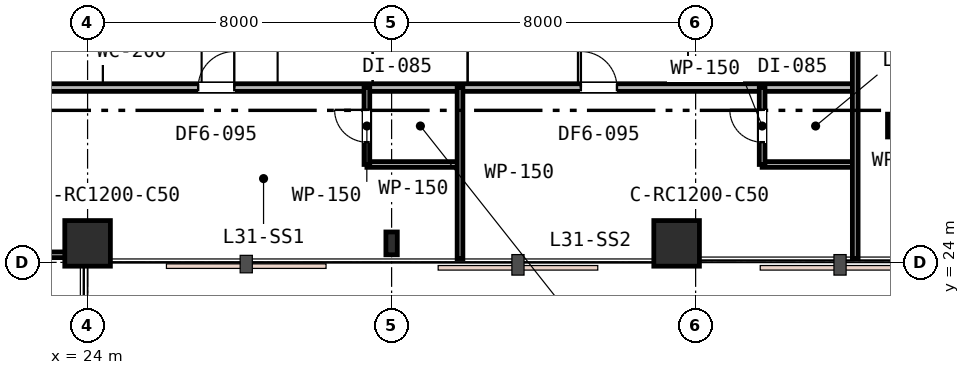
"""IFC4 building model, lengths in metres.
Left out: names, types, materials, properties, quantities, classifications, styles, units other than length and angle.
Written with IfcOpenShell. Run it as: python <this file> out.ifc"""

import sys

from ifc_helpers import new_model, si_unit, direction, frame, frame_2d, origin, origin_2d, place, context, subcontext, project, spatial, rectangle, i_section, extrude, element, fill, save


model = new_model("IFC4")
c1 = context("Model", 3, precision=1e-05, world=origin(), true_north=direction((0.0, 1.0)))
c2 = subcontext(c1, "Body", "Model", "MODEL_VIEW")
j1 = project(units=[si_unit("LENGTHUNIT", "METRE"), si_unit("PLANEANGLEUNIT", "RADIAN")], contexts=[c1])
p1 = place(None, origin())
s1 = spatial("IfcSite", under=j1, at=p1, CompositionType="ELEMENT")
p2 = place(p1, origin())
s2 = spatial("IfcBuilding", under=s1, at=p2, CompositionType="ELEMENT")
p3 = place(p2, frame((0.0, 0.0, 122.4)))
s3 = spatial("IfcBuildingStorey", under=s2, at=p3, CompositionType="ELEMENT", Elevation=122.4)
p4 = place(p3, frame((24.0, 24.5, 0.0), z_axis=(0.0, 0.0, 1.0), x_axis=(1.0, 0.0, 0.0)))
e1 = element("IfcColumn", 1, at=p4, inside=s3, PredefinedType="COLUMN", context=c2, shape_type="SweptSolid", body=[
    extrude(rectangle(XDim=1.2, YDim=1.2, at=origin_2d()), origin(), (0.0, 0.0, 1.0), 3.6),
])
p5 = place(p3, frame((32.0, 24.5, 0.0), z_axis=(0.0, 0.0, 1.0), x_axis=(1.0, 0.0, 0.0)))
e2 = element("IfcColumn", 2, at=p5, inside=s3, PredefinedType="COLUMN", context=c2, shape_type="SweptSolid", body=[
    extrude(i_section(OverallWidth=0.3, OverallDepth=0.6, WebThickness=0.015, FlangeThickness=0.03, FilletRadius=0.027, at=origin_2d()), origin(), (0.0, 0.0, 1.0), 3.6),
])
p6 = place(p3, frame((39.5, 24.5, 0.0), z_axis=(0.0, 0.0, 1.0), x_axis=(1.0, 0.0, 0.0)))
e3 = element("IfcColumn", 3, at=p6, inside=s3, PredefinedType="COLUMN", context=c2, shape_type="SweptSolid", body=[
    extrude(rectangle(XDim=1.2, YDim=1.2, at=origin_2d()), origin(), (0.0, 0.0, 1.0), 3.6),
])
p7 = place(p3, frame((45.2, 27.6, 0.0), z_axis=(0.0, 0.0, 1.0), x_axis=(1.0, 0.0, 0.0)))
e4 = element("IfcColumn", 4, at=p7, inside=s3, PredefinedType="COLUMN", context=c2, shape_type="SweptSolid", body=[
    extrude(i_section(OverallWidth=0.3, OverallDepth=0.6, WebThickness=0.015, FlangeThickness=0.03, FilletRadius=0.027, at=origin_2d()), origin(), (0.0, 0.0, 1.0), 3.6),
])
p8 = place(p3, frame((7.2, 28.6, 0.0), z_axis=(0.0, 0.0, 1.0), x_axis=(1.0, 0.0, 0.0)))
e5 = element("IfcWall", 5, at=p8, inside=s3, PredefinedType="PARTITIONING", context=c2, shape_type="SweptSolid", body=[
    extrude(rectangle(XDim=37.0, YDim=0.2, at=frame_2d((18.5, 0.0))), origin(), (0.0, 0.0, 1.0), 2.87),
])
p9 = place(p8, frame((19.71, 0.0, 0.0)))
e6 = element("IfcOpeningElement", 6, at=p9, cuts=e5, PredefinedType="OPENING", context=c2, shape_type="SweptSolid", body=[
    extrude(rectangle(XDim=0.95, YDim=2.15, at=frame_2d((0.475, 1.075))), frame((0.0, 0.11, 0.0), z_axis=(0.0, -1.0, 0.0), x_axis=(1.0, 0.0, 0.0)), (0.0, 0.0, 1.0), 0.22),
])
p10 = place(p8, frame((29.78, 0.0, 0.0)))
e7 = element("IfcOpeningElement", 7, at=p10, cuts=e5, PredefinedType="OPENING", context=c2, shape_type="SweptSolid", body=[
    extrude(rectangle(XDim=0.95, YDim=2.15, at=frame_2d((0.475, 1.075))), frame((0.0, 0.11, 0.0), z_axis=(0.0, -1.0, 0.0), x_axis=(1.0, 0.0, 0.0)), (0.0, 0.0, 1.0), 0.22),
])
p11 = place(p3, frame((7.2, 24.2, 0.0), z_axis=(0.0, 0.0, 1.0), x_axis=(1.0, 0.0, 0.0)))
e8 = element("IfcWall", 8, at=p11, inside=s3, PredefinedType="PARTITIONING", context=c2, shape_type="SweptSolid", body=[
    extrude(rectangle(XDim=16.7, YDim=0.15, at=frame_2d((8.35, 0.0))), origin(), (0.0, 0.0, 1.0), 2.87),
])
p12 = place(p3, frame((31.35, 26.576, 0.0), z_axis=(0.0, 0.0, 1.0), x_axis=(1.0, 0.0, 0.0)))
e9 = element("IfcWall", 9, at=p12, inside=s3, PredefinedType="PARTITIONING", context=c2, shape_type="SweptSolid", body=[
    extrude(rectangle(XDim=2.45, YDim=0.15, at=frame_2d((1.225, 0.0))), origin(), (0.0, 0.0, 1.0), 3.33),
])
p13 = place(p3, frame((31.35, 26.576, 0.0), z_axis=(0.0, 0.0, 1.0), x_axis=(0.0, 1.0, 0.0)))
e10 = element("IfcWall", 10, at=p13, inside=s3, PredefinedType="PARTITIONING", context=c2, shape_type="SweptSolid", body=[
    extrude(rectangle(XDim=2.024, YDim=0.15, at=frame_2d((1.012, 0.0))), origin(), (0.0, 0.0, 1.0), 3.33),
])
p14 = place(p13, frame((0.587, 0.0, 0.0)))
e11 = element("IfcOpeningElement", 11, at=p14, cuts=e10, PredefinedType="OPENING", context=c2, shape_type="SweptSolid", body=[
    extrude(rectangle(XDim=0.85, YDim=2.15, at=frame_2d((0.425, 1.075))), frame((0.0, 0.085, 0.0), z_axis=(0.0, -1.0, 0.0), x_axis=(1.0, 0.0, 0.0)), (0.0, 0.0, 1.0), 0.17),
])
p15 = place(p3, frame((33.8, 28.6, 0.0), z_axis=(0.0, 0.0, 1.0), x_axis=(0.0, -1.0, 0.0)))
e12 = element("IfcWall", 12, at=p15, inside=s3, PredefinedType="PARTITIONING", context=c2, shape_type="SweptSolid", body=[
    extrude(rectangle(XDim=4.5, YDim=0.15, at=frame_2d((2.25, 0.0))), origin(), (0.0, 0.0, 1.0), 2.96),
])
p16 = place(p3, frame((41.75, 26.576, 0.0), z_axis=(0.0, 0.0, 1.0), x_axis=(1.0, 0.0, 0.0)))
e13 = element("IfcWall", 13, at=p16, inside=s3, PredefinedType="PARTITIONING", context=c2, shape_type="SweptSolid", body=[
    extrude(rectangle(XDim=2.45, YDim=0.15, at=frame_2d((1.225, 0.0))), origin(), (0.0, 0.0, 1.0), 3.33),
])
p17 = place(p3, frame((41.75, 26.576, 0.0), z_axis=(0.0, 0.0, 1.0), x_axis=(0.0, 1.0, 0.0)))
e14 = element("IfcWall", 14, at=p17, inside=s3, PredefinedType="PARTITIONING", context=c2, shape_type="SweptSolid", body=[
    extrude(rectangle(XDim=2.024, YDim=0.15, at=frame_2d((1.012, 0.0))), origin(), (0.0, 0.0, 1.0), 3.33),
])
p18 = place(p17, frame((0.587, 0.0, 0.0)))
e15 = element("IfcOpeningElement", 15, at=p18, cuts=e14, PredefinedType="OPENING", context=c2, shape_type="SweptSolid", body=[
    extrude(rectangle(XDim=0.85, YDim=2.15, at=frame_2d((0.425, 1.075))), frame((0.0, 0.085, 0.0), z_axis=(0.0, -1.0, 0.0), x_axis=(1.0, 0.0, 0.0)), (0.0, 0.0, 1.0), 0.17),
])
p19 = place(p3, frame((44.2, 30.8, 0.0), z_axis=(0.0, 0.0, 1.0), x_axis=(0.0, -1.0, 0.0)))
e16 = element("IfcWall", 16, at=p19, inside=s3, PredefinedType="PARTITIONING", context=c2, shape_type="SweptSolid", body=[
    extrude(rectangle(XDim=6.7, YDim=0.15, at=frame_2d((3.35, 0.0))), origin(), (0.0, 0.0, 1.0), 2.87),
])
p20 = place(p9, origin())
e17 = element("IfcDoor", 17, at=p20, inside=s3, OperationType="SINGLE_SWING_RIGHT", PredefinedType="DOOR", context=c2, shape_type="SweptSolid", body=[
    extrude(rectangle(XDim=0.95, YDim=2.15, at=frame_2d((0.475, 1.075))), frame((0.0, 0.025, 0.0), z_axis=(0.0, -1.0, 0.0), x_axis=(1.0, 0.0, 0.0)), (0.0, 0.0, 1.0), 0.05),
])
fill(e6, e17)
p21 = place(p14, origin())
e18 = element("IfcDoor", 18, at=p21, inside=s3, OperationType="SINGLE_SWING_RIGHT", PredefinedType="DOOR", context=c2, shape_type="SweptSolid", body=[
    extrude(rectangle(XDim=0.85, YDim=2.15, at=frame_2d((0.425, 1.075))), frame((0.0, 0.025, 0.0), z_axis=(0.0, -1.0, 0.0), x_axis=(1.0, 0.0, 0.0)), (0.0, 0.0, 1.0), 0.05),
])
fill(e11, e18)
p22 = place(p10, origin())
e19 = element("IfcDoor", 19, at=p22, inside=s3, OperationType="SINGLE_SWING_LEFT", PredefinedType="DOOR", context=c2, shape_type="SweptSolid", body=[
    extrude(rectangle(XDim=0.95, YDim=2.15, at=frame_2d((0.475, 1.075))), frame((0.0, 0.025, 0.0), z_axis=(0.0, -1.0, 0.0), x_axis=(1.0, 0.0, 0.0)), (0.0, 0.0, 1.0), 0.05),
])
fill(e7, e19)
p23 = place(p18, origin())
e20 = element("IfcDoor", 20, at=p23, inside=s3, OperationType="SINGLE_SWING_RIGHT", PredefinedType="DOOR", context=c2, shape_type="SweptSolid", body=[
    extrude(rectangle(XDim=0.85, YDim=2.15, at=frame_2d((0.425, 1.075))), frame((0.0, 0.025, 0.0), z_axis=(0.0, -1.0, 0.0), x_axis=(1.0, 0.0, 0.0)), (0.0, 0.0, 1.0), 0.05),
])
fill(e15, e20)
save(model, sys.argv[1])
